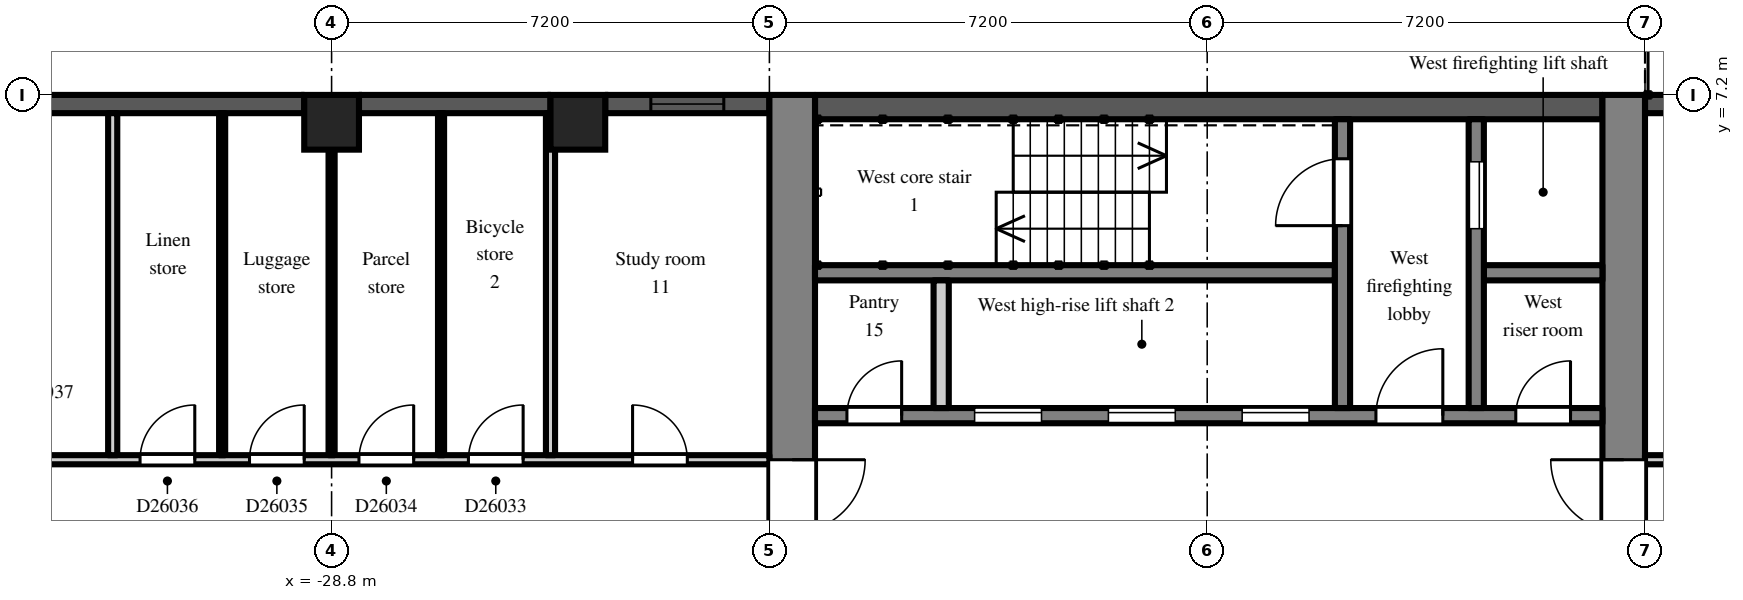
"""IFC4 building model, lengths in metres.
Left out: names, types, materials, properties, quantities, classifications, styles, units other than length and angle.
Written with IfcOpenShell. Run it as: python <this file> out.ifc"""

import sys

from ifc_helpers import new_model, si_unit, direction, frame, frame_2d, origin, origin_2d, place, context, subcontext, project, spatial, rectangle, extrude, element, fill, save


model = new_model("IFC4")
c1 = context("Model", 3, precision=1e-05, world=origin(), true_north=direction((0.0, 1.0)))
c2 = subcontext(c1, "Body", "Model", "MODEL_VIEW")
j1 = project(units=[si_unit("LENGTHUNIT", "METRE"), si_unit("PLANEANGLEUNIT", "RADIAN")], contexts=[c1])
p1 = place(None, origin())
s1 = spatial("IfcSite", under=j1, at=p1, CompositionType="ELEMENT")
p2 = place(p1, origin())
s2 = spatial("IfcBuilding", under=s1, at=p2, CompositionType="ELEMENT")
p3 = place(p2, frame((0.0, 0.0, 179.7)))
s3 = spatial("IfcBuildingStorey", under=s2, at=p3, CompositionType="ELEMENT", Elevation=179.7)
for number, where, z_axis, x_axis in (
    (1, (-28.8, 6.75, 0.0), (0.0, 0.0, 1.0), (1.0, 0.0, 0.0)),
    (2, (-24.75, 6.75, 0.0), (0.0, 0.0, 1.0), (1.0, 0.0, 0.0)),
):
    element("IfcColumn", number, at=place(p3, frame(where, z_axis=z_axis, x_axis=x_axis)), inside=s3, PredefinedType="COLUMN", context=c2, shape_type="SweptSolid", body=[
        extrude(rectangle(XDim=0.9, YDim=0.9, at=origin_2d()), origin(), (0.0, 0.0, 1.0), 3.0),
    ])
p4 = place(p3, frame((-4.2, 7.05, 0.0), z_axis=(0.0, 0.0, 1.0), x_axis=(-1.0, 0.0, 0.0)))
e3 = element("IfcWall", 3, at=p4, inside=s3, PredefinedType="SOLIDWALL", context=c2, shape_type="SweptSolid", body=[
    extrude(rectangle(XDim=3.0, YDim=0.3, at=frame_2d((1.5, 0.0))), origin(), (0.0, 0.0, 1.0), 2.2),
])
p5 = place(p3, frame((-21.6, 7.05, 0.0), z_axis=(0.0, 0.0, 1.0), x_axis=(-1.0, 0.0, 0.0)))
e4 = element("IfcWall", 4, at=p5, inside=s3, PredefinedType="SOLIDWALL", context=c2, shape_type="SweptSolid", body=[
    extrude(rectangle(XDim=2.7, YDim=0.3, at=frame_2d((1.35, 0.0))), origin(), (0.0, 0.0, 1.0), 2.2),
])
p6 = place(p5, frame((0.75, 0.0, 0.2)))
e5 = element("IfcOpeningElement", 5, at=p6, cuts=e4, PredefinedType="OPENING", context=c2, shape_type="SweptSolid", body=[
    extrude(rectangle(XDim=1.2, YDim=1.85, at=frame_2d((0.6, 0.925))), frame((0.0, 0.16, 0.0), z_axis=(0.0, -1.0, 0.0), x_axis=(1.0, 0.0, 0.0)), (0.0, 0.0, 1.0), 0.32),
])
p7 = place(p3, frame((-25.2, 7.05, 0.0), z_axis=(0.0, 0.0, 1.0), x_axis=(-1.0, 0.0, 0.0)))
e6 = element("IfcWall", 6, at=p7, inside=s3, PredefinedType="SOLIDWALL", context=c2, shape_type="SweptSolid", body=[
    extrude(rectangle(XDim=3.15, YDim=0.3, at=frame_2d((1.575, 0.0))), origin(), (0.0, 0.0, 1.0), 2.2),
])
p8 = place(p3, frame((-29.25, 7.05, 0.0), z_axis=(0.0, 0.0, 1.0), x_axis=(-1.0, 0.0, 0.0)))
e7 = element("IfcWall", 7, at=p8, inside=s3, PredefinedType="SOLIDWALL", context=c2, shape_type="SweptSolid", body=[
    extrude(rectangle(XDim=6.3, YDim=0.3, at=frame_2d((3.15, 0.0))), origin(), (0.0, 0.0, 1.0), 2.2),
])
p9 = place(p3, frame((-7.55, -7.2, 0.0), z_axis=(0.0, 0.0, 1.0), x_axis=(0.0, 1.0, 0.0)))
e8 = element("IfcWall", 8, at=p9, inside=s3, PredefinedType="SHEAR", context=c2, shape_type="SweptSolid", body=[
    extrude(rectangle(XDim=14.4, YDim=0.7, at=frame_2d((7.2, 0.0))), origin(), (0.0, 0.0, 1.0), 2.6),
])
p10 = place(p9, frame((6.0, 0.0, 0.0)))
e9 = element("IfcOpeningElement", 9, at=p10, cuts=e8, PredefinedType="OPENING", context=c2, shape_type="SweptSolid", body=[
    extrude(rectangle(XDim=2.4, YDim=2.2, at=frame_2d((1.2, 1.1))), frame((0.0, 0.36, 0.0), z_axis=(0.0, -1.0, 0.0), x_axis=(1.0, 0.0, 0.0)), (0.0, 0.0, 1.0), 0.72),
])
p11 = place(p3, frame((-21.225, -7.2, 0.0), z_axis=(0.0, 0.0, 1.0), x_axis=(0.0, 1.0, 0.0)))
e10 = element("IfcWall", 10, at=p11, inside=s3, PredefinedType="SHEAR", context=c2, shape_type="SweptSolid", body=[
    extrude(rectangle(XDim=14.4, YDim=0.75, at=frame_2d((7.2, 0.0))), origin(), (0.0, 0.0, 1.0), 2.6),
])
p12 = place(p11, frame((6.0, 0.0, 0.0)))
e11 = element("IfcOpeningElement", 11, at=p12, cuts=e10, PredefinedType="OPENING", context=c2, shape_type="SweptSolid", body=[
    extrude(rectangle(XDim=2.4, YDim=2.2, at=frame_2d((1.2, 1.1))), frame((0.0, 0.385, 0.0), z_axis=(0.0, -1.0, 0.0), x_axis=(1.0, 0.0, 0.0)), (0.0, 0.0, 1.0), 0.77),
])
p13 = place(p3, frame((-7.9, 7.0, 0.0), z_axis=(0.0, 0.0, 1.0), x_axis=(-1.0, 0.0, 0.0)))
e12 = element("IfcWall", 12, at=p13, inside=s3, PredefinedType="SHEAR", context=c2, shape_type="SweptSolid", body=[
    extrude(rectangle(XDim=12.95, YDim=0.4, at=frame_2d((6.475, 0.0))), origin(), (0.0, 0.0, 1.0), 2.6),
])
p14 = place(p3, frame((-7.9, 1.925, 0.0), z_axis=(0.0, 0.0, 1.0), x_axis=(-1.0, 0.0, 0.0)))
e13 = element("IfcWall", 13, at=p14, inside=s3, PredefinedType="SHEAR", context=c2, shape_type="SweptSolid", body=[
    extrude(rectangle(XDim=12.95, YDim=0.25, at=frame_2d((6.475, 0.0))), origin(), (0.0, 0.0, 1.0), 2.6),
])
p15 = place(p14, frame((4.825, 0.0, 0.0)))
e14 = element("IfcOpeningElement", 14, at=p15, cuts=e13, PredefinedType="OPENING", context=c2, shape_type="SweptSolid", body=[
    extrude(rectangle(XDim=1.1, YDim=2.1, at=frame_2d((0.55, 1.05))), frame((0.0, 0.135, 0.0), z_axis=(0.0, -1.0, 0.0), x_axis=(1.0, 0.0, 0.0)), (0.0, 0.0, 1.0), 0.27),
])
p16 = place(p14, frame((7.025, 0.0, 0.0)))
e15 = element("IfcOpeningElement", 15, at=p16, cuts=e13, PredefinedType="OPENING", context=c2, shape_type="SweptSolid", body=[
    extrude(rectangle(XDim=1.1, YDim=2.1, at=frame_2d((0.55, 1.05))), frame((0.0, 0.135, 0.0), z_axis=(0.0, -1.0, 0.0), x_axis=(1.0, 0.0, 0.0)), (0.0, 0.0, 1.0), 0.27),
])
p17 = place(p14, frame((9.225, 0.0, 0.0)))
e16 = element("IfcOpeningElement", 16, at=p17, cuts=e13, PredefinedType="OPENING", context=c2, shape_type="SweptSolid", body=[
    extrude(rectangle(XDim=1.1, YDim=2.1, at=frame_2d((0.55, 1.05))), frame((0.0, 0.135, 0.0), z_axis=(0.0, -1.0, 0.0), x_axis=(1.0, 0.0, 0.0)), (0.0, 0.0, 1.0), 0.27),
])
p18 = place(p14, frame((0.525, 0.0, 0.0)))
e17 = element("IfcOpeningElement", 17, at=p18, cuts=e13, PredefinedType="OPENING", context=c2, shape_type="SweptSolid", body=[
    extrude(rectangle(XDim=0.9, YDim=2.1, at=frame_2d((0.45, 1.05))), frame((0.0, 0.135, 0.0), z_axis=(0.0, -1.0, 0.0), x_axis=(1.0, 0.0, 0.0)), (0.0, 0.0, 1.0), 0.27),
])
p19 = place(p14, frame((2.625, 0.0, 0.0)))
e18 = element("IfcOpeningElement", 18, at=p19, cuts=e13, PredefinedType="OPENING", context=c2, shape_type="SweptSolid", body=[
    extrude(rectangle(XDim=1.1, YDim=2.1, at=frame_2d((0.55, 1.05))), frame((0.0, 0.135, 0.0), z_axis=(0.0, -1.0, 0.0), x_axis=(1.0, 0.0, 0.0)), (0.0, 0.0, 1.0), 0.27),
])
p20 = place(p14, frame((11.525, 0.0, 0.0)))
e19 = element("IfcOpeningElement", 19, at=p20, cuts=e13, PredefinedType="OPENING", context=c2, shape_type="SweptSolid", body=[
    extrude(rectangle(XDim=0.9, YDim=2.1, at=frame_2d((0.45, 1.05))), frame((0.0, 0.135, 0.0), z_axis=(0.0, -1.0, 0.0), x_axis=(1.0, 0.0, 0.0)), (0.0, 0.0, 1.0), 0.27),
])
p21 = place(p3, frame((-7.9, 4.275, 0.0), z_axis=(0.0, 0.0, 1.0), x_axis=(-1.0, 0.0, 0.0)))
e20 = element("IfcWall", 20, at=p21, inside=s3, PredefinedType="SHEAR", context=c2, shape_type="SweptSolid", body=[
    extrude(rectangle(XDim=1.95, YDim=0.25, at=frame_2d((0.975, 0.0))), origin(), (0.0, 0.0, 1.0), 2.6),
])
p22 = place(p3, frame((-12.3, 4.275, 0.0), z_axis=(0.0, 0.0, 1.0), x_axis=(-1.0, 0.0, 0.0)))
e21 = element("IfcWall", 21, at=p22, inside=s3, PredefinedType="SHEAR", context=c2, shape_type="SweptSolid", body=[
    extrude(rectangle(XDim=8.55, YDim=0.25, at=frame_2d((4.275, 0.0))), origin(), (0.0, 0.0, 1.0), 2.6),
])
p23 = place(p3, frame((-9.975, 2.05, 0.0), z_axis=(0.0, 0.0, 1.0), x_axis=(0.0, 1.0, 0.0)))
e22 = element("IfcWall", 22, at=p23, inside=s3, PredefinedType="SHEAR", context=c2, shape_type="SweptSolid", body=[
    extrude(rectangle(XDim=4.75, YDim=0.25, at=frame_2d((2.375, 0.0))), origin(), (0.0, 0.0, 1.0), 2.6),
])
p24 = place(p23, frame((2.95, 0.0, 0.0)))
e23 = element("IfcOpeningElement", 23, at=p24, cuts=e22, PredefinedType="OPENING", context=c2, shape_type="SweptSolid", body=[
    extrude(rectangle(XDim=1.1, YDim=2.1, at=frame_2d((0.55, 1.05))), frame((0.0, 0.135, 0.0), z_axis=(0.0, -1.0, 0.0), x_axis=(1.0, 0.0, 0.0)), (0.0, 0.0, 1.0), 0.27),
])
p25 = place(p3, frame((-12.175, 2.05, 0.0), z_axis=(0.0, 0.0, 1.0), x_axis=(0.0, 1.0, 0.0)))
e24 = element("IfcWall", 24, at=p25, inside=s3, PredefinedType="SHEAR", context=c2, shape_type="SweptSolid", body=[
    extrude(rectangle(XDim=4.75, YDim=0.25, at=frame_2d((2.375, 0.0))), origin(), (0.0, 0.0, 1.0), 2.6),
])
p26 = place(p25, frame((3.0, 0.0, 0.0)))
e25 = element("IfcOpeningElement", 25, at=p26, cuts=e24, PredefinedType="OPENING", context=c2, shape_type="SweptSolid", body=[
    extrude(rectangle(XDim=1.1, YDim=2.1, at=frame_2d((0.55, 1.05))), frame((0.0, 0.135, 0.0), z_axis=(0.0, -1.0, 0.0), x_axis=(1.0, 0.0, 0.0)), (0.0, 0.0, 1.0), 0.27),
])
p27 = place(p3, frame((-18.775, 2.05, 0.0), z_axis=(0.0, 0.0, 1.0), x_axis=(0.0, 1.0, 0.0)))
e26 = element("IfcWall", 26, at=p27, inside=s3, PredefinedType="PARTITIONING", context=c2, shape_type="SweptSolid", body=[
    extrude(rectangle(XDim=2.1, YDim=0.25, at=frame_2d((1.05, 0.0))), origin(), (0.0, 0.0, 1.0), 2.6),
])
p28 = place(p3, frame((-36.5, 1.2, 0.0), z_axis=(0.0, 0.0, 1.0), x_axis=(1.0, 0.0, 0.0)))
e27 = element("IfcWall", 27, at=p28, inside=s3, PredefinedType="PARTITIONING", context=c2, shape_type="SweptSolid", body=[
    extrude(rectangle(XDim=14.9, YDim=0.15, at=frame_2d((7.45, 0.0))), origin(), (0.0, 0.0, 1.0), 2.6),
])
p29 = place(p28, frame((12.65, 0.0, 0.0)))
e28 = element("IfcOpeningElement", 28, at=p29, cuts=e27, PredefinedType="OPENING", context=c2, shape_type="SweptSolid", body=[
    extrude(rectangle(XDim=0.9, YDim=2.1, at=frame_2d((0.45, 1.05))), frame((0.0, 0.085, 0.0), z_axis=(0.0, -1.0, 0.0), x_axis=(1.0, 0.0, 0.0)), (0.0, 0.0, 1.0), 0.17),
])
p30 = place(p28, frame((9.95, 0.0, 0.0)))
e29 = element("IfcOpeningElement", 29, at=p30, cuts=e27, PredefinedType="OPENING", context=c2, shape_type="SweptSolid", body=[
    extrude(rectangle(XDim=0.9, YDim=2.1, at=frame_2d((0.45, 1.05))), frame((0.0, 0.085, 0.0), z_axis=(0.0, -1.0, 0.0), x_axis=(1.0, 0.0, 0.0)), (0.0, 0.0, 1.0), 0.17),
])
p31 = place(p28, frame((8.15, 0.0, 0.0)))
e30 = element("IfcOpeningElement", 30, at=p31, cuts=e27, PredefinedType="OPENING", context=c2, shape_type="SweptSolid", body=[
    extrude(rectangle(XDim=0.9, YDim=2.1, at=frame_2d((0.45, 1.05))), frame((0.0, 0.085, 0.0), z_axis=(0.0, -1.0, 0.0), x_axis=(1.0, 0.0, 0.0)), (0.0, 0.0, 1.0), 0.17),
])
p32 = place(p28, frame((6.35, 0.0, 0.0)))
e31 = element("IfcOpeningElement", 31, at=p32, cuts=e27, PredefinedType="OPENING", context=c2, shape_type="SweptSolid", body=[
    extrude(rectangle(XDim=0.9, YDim=2.1, at=frame_2d((0.45, 1.05))), frame((0.0, 0.085, 0.0), z_axis=(0.0, -1.0, 0.0), x_axis=(1.0, 0.0, 0.0)), (0.0, 0.0, 1.0), 0.17),
])
p33 = place(p28, frame((4.55, 0.0, 0.0)))
e32 = element("IfcOpeningElement", 32, at=p33, cuts=e27, PredefinedType="OPENING", context=c2, shape_type="SweptSolid", body=[
    extrude(rectangle(XDim=0.9, YDim=2.1, at=frame_2d((0.45, 1.05))), frame((0.0, 0.085, 0.0), z_axis=(0.0, -1.0, 0.0), x_axis=(1.0, 0.0, 0.0)), (0.0, 0.0, 1.0), 0.17),
])
p34 = place(p28, frame((1.15, 0.0, 0.0)))
e33 = element("IfcOpeningElement", 33, at=p34, cuts=e27, PredefinedType="OPENING", context=c2, shape_type="SweptSolid", body=[
    extrude(rectangle(XDim=1.8, YDim=2.1, at=frame_2d((0.9, 1.05))), frame((0.0, 0.085, 0.0), z_axis=(0.0, -1.0, 0.0), x_axis=(1.0, 0.0, 0.0)), (0.0, 0.0, 1.0), 0.17),
])
p35 = place(p3, frame((-32.4, 1.275, 0.0), z_axis=(0.0, 0.0, 1.0), x_axis=(0.0, 1.0, 0.0)))
e34 = element("IfcWall", 34, at=p35, inside=s3, PredefinedType="PARTITIONING", context=c2, shape_type="SweptSolid", body=[
    extrude(rectangle(XDim=5.625, YDim=0.15, at=frame_2d((2.812, 0.0))), origin(), (0.0, 0.0, 1.0), 2.6),
])
for number, where, z_axis, x_axis in (
    (35, (-30.6, 1.275, 0.0), (0.0, 0.0, 1.0), (0.0, 1.0, 0.0)),
    (36, (-28.8, 1.275, 0.0), (0.0, 0.0, 1.0), (0.0, 1.0, 0.0)),
    (37, (-27.0, 1.275, 0.0), (0.0, 0.0, 1.0), (0.0, 1.0, 0.0)),
):
    element("IfcWall", number, at=place(p3, frame(where, z_axis=z_axis, x_axis=x_axis)), inside=s3, PredefinedType="PARTITIONING", context=c2, shape_type="SweptSolid", body=[
        extrude(rectangle(XDim=5.625, YDim=0.1, at=frame_2d((2.812, 0.0))), origin(), (0.0, 0.0, 1.0), 2.6),
    ])
p36 = place(p3, frame((-25.2, 1.275, 0.0), z_axis=(0.0, 0.0, 1.0), x_axis=(0.0, 1.0, 0.0)))
e38 = element("IfcWall", 38, at=p36, inside=s3, PredefinedType="PARTITIONING", context=c2, shape_type="SweptSolid", body=[
    extrude(rectangle(XDim=5.625, YDim=0.15, at=frame_2d((2.812, 0.0))), origin(), (0.0, 0.0, 1.0), 2.6),
])
p37 = place(p3, frame((-7.2, 1.2, 0.0), z_axis=(0.0, 0.0, 1.0), x_axis=(1.0, 0.0, 0.0)))
e39 = element("IfcWall", 39, at=p37, inside=s3, PredefinedType="PARTITIONING", context=c2, shape_type="SweptSolid", body=[
    extrude(rectangle(XDim=6.075, YDim=0.15, at=frame_2d((3.038, 0.0))), origin(), (0.0, 0.0, 1.0), 2.6),
])
p38 = place(p37, frame((1.05, 0.0, 0.0)))
e40 = element("IfcOpeningElement", 40, at=p38, cuts=e39, PredefinedType="OPENING", context=c2, shape_type="SweptSolid", body=[
    extrude(rectangle(XDim=0.9, YDim=2.1, at=frame_2d((0.45, 1.05))), frame((0.0, 0.085, 0.0), z_axis=(0.0, -1.0, 0.0), x_axis=(1.0, 0.0, 0.0)), (0.0, 0.0, 1.0), 0.17),
])
p39 = place(p6, origin())
e41 = element("IfcWindow", 41, at=p39, inside=s3, PartitioningType="SINGLE_PANEL", PredefinedType="WINDOW", context=c2, shape_type="SweptSolid", body=[
    extrude(rectangle(XDim=1.2, YDim=1.85, at=frame_2d((0.6, 0.925))), frame((0.0, 0.03, 0.0), z_axis=(0.0, -1.0, 0.0), x_axis=(1.0, 0.0, 0.0)), (0.0, 0.0, 1.0), 0.06),
])
fill(e5, e41)
p40 = place(p15, origin())
e42 = element("IfcDoor", 42, at=p40, inside=s3, OperationType="SLIDING_TO_LEFT", PredefinedType="DOOR", context=c2, shape_type="SweptSolid", body=[
    extrude(rectangle(XDim=1.1, YDim=2.1, at=frame_2d((0.55, 1.05))), frame((0.0, 0.025, 0.0), z_axis=(0.0, -1.0, 0.0), x_axis=(1.0, 0.0, 0.0)), (0.0, 0.0, 1.0), 0.05),
])
fill(e14, e42)
p41 = place(p16, origin())
e43 = element("IfcDoor", 43, at=p41, inside=s3, OperationType="SLIDING_TO_LEFT", PredefinedType="DOOR", context=c2, shape_type="SweptSolid", body=[
    extrude(rectangle(XDim=1.1, YDim=2.1, at=frame_2d((0.55, 1.05))), frame((0.0, 0.025, 0.0), z_axis=(0.0, -1.0, 0.0), x_axis=(1.0, 0.0, 0.0)), (0.0, 0.0, 1.0), 0.05),
])
fill(e15, e43)
p42 = place(p17, origin())
e44 = element("IfcDoor", 44, at=p42, inside=s3, OperationType="SLIDING_TO_LEFT", PredefinedType="DOOR", context=c2, shape_type="SweptSolid", body=[
    extrude(rectangle(XDim=1.1, YDim=2.1, at=frame_2d((0.55, 1.05))), frame((0.0, 0.025, 0.0), z_axis=(0.0, -1.0, 0.0), x_axis=(1.0, 0.0, 0.0)), (0.0, 0.0, 1.0), 0.05),
])
fill(e16, e44)
p43 = place(p24, origin())
e45 = element("IfcDoor", 45, at=p43, inside=s3, OperationType="SLIDING_TO_LEFT", PredefinedType="DOOR", context=c2, shape_type="SweptSolid", body=[
    extrude(rectangle(XDim=1.1, YDim=2.1, at=frame_2d((0.55, 1.05))), frame((0.0, 0.025, 0.0), z_axis=(0.0, -1.0, 0.0), x_axis=(1.0, 0.0, 0.0)), (0.0, 0.0, 1.0), 0.05),
])
fill(e23, e45)
p44 = place(p26, origin())
e46 = element("IfcDoor", 46, at=p44, inside=s3, OperationType="SINGLE_SWING_LEFT", PredefinedType="DOOR", context=c2, shape_type="SweptSolid", body=[
    extrude(rectangle(XDim=1.1, YDim=2.1, at=frame_2d((0.55, 1.05))), frame((0.0, 0.025, 0.0), z_axis=(0.0, -1.0, 0.0), x_axis=(1.0, 0.0, 0.0)), (0.0, 0.0, 1.0), 0.05),
])
fill(e25, e46)
p45 = place(p18, frame((0.9, 0.0, 0.0), z_axis=(0.0, 0.0, 1.0), x_axis=(-1.0, 0.0, 0.0)))
e47 = element("IfcDoor", 47, at=p45, inside=s3, OperationType="SINGLE_SWING_RIGHT", PredefinedType="DOOR", context=c2, shape_type="SweptSolid", body=[
    extrude(rectangle(XDim=0.9, YDim=2.1, at=frame_2d((0.45, 1.05))), frame((0.0, 0.025, 0.0), z_axis=(0.0, -1.0, 0.0), x_axis=(1.0, 0.0, 0.0)), (0.0, 0.0, 1.0), 0.05),
])
fill(e17, e47)
p46 = place(p19, frame((1.1, 0.0, 0.0), z_axis=(0.0, 0.0, 1.0), x_axis=(-1.0, 0.0, 0.0)))
e48 = element("IfcDoor", 48, at=p46, inside=s3, OperationType="SINGLE_SWING_RIGHT", PredefinedType="DOOR", context=c2, shape_type="SweptSolid", body=[
    extrude(rectangle(XDim=1.1, YDim=2.1, at=frame_2d((0.55, 1.05))), frame((0.0, 0.025, 0.0), z_axis=(0.0, -1.0, 0.0), x_axis=(1.0, 0.0, 0.0)), (0.0, 0.0, 1.0), 0.05),
])
fill(e18, e48)
p47 = place(p10, origin())
e49 = element("IfcDoor", 49, at=p47, inside=s3, OperationType="DOUBLE_DOOR_DOUBLE_SWING", PredefinedType="DOOR", context=c2, shape_type="SweptSolid", body=[
    extrude(rectangle(XDim=2.4, YDim=2.2, at=frame_2d((1.2, 1.1))), frame((0.0, 0.025, 0.0), z_axis=(0.0, -1.0, 0.0), x_axis=(1.0, 0.0, 0.0)), (0.0, 0.0, 1.0), 0.05),
])
fill(e9, e49)
p48 = place(p12, frame((2.4, 0.0, 0.0), z_axis=(0.0, 0.0, 1.0), x_axis=(-1.0, 0.0, 0.0)))
e50 = element("IfcDoor", 50, at=p48, inside=s3, OperationType="DOUBLE_DOOR_DOUBLE_SWING", PredefinedType="DOOR", context=c2, shape_type="SweptSolid", body=[
    extrude(rectangle(XDim=2.4, YDim=2.2, at=frame_2d((1.2, 1.1))), frame((0.0, 0.025, 0.0), z_axis=(0.0, -1.0, 0.0), x_axis=(1.0, 0.0, 0.0)), (0.0, 0.0, 1.0), 0.05),
])
fill(e11, e50)
p49 = place(p20, frame((0.9, 0.0, 0.0), z_axis=(0.0, 0.0, 1.0), x_axis=(-1.0, 0.0, 0.0)))
e51 = element("IfcDoor", 51, at=p49, inside=s3, OperationType="SINGLE_SWING_RIGHT", PredefinedType="DOOR", context=c2, shape_type="SweptSolid", body=[
    extrude(rectangle(XDim=0.9, YDim=2.1, at=frame_2d((0.45, 1.05))), frame((0.0, 0.025, 0.0), z_axis=(0.0, -1.0, 0.0), x_axis=(1.0, 0.0, 0.0)), (0.0, 0.0, 1.0), 0.05),
])
fill(e19, e51)
p50 = place(p29, origin())
e52 = element("IfcDoor", 52, at=p50, inside=s3, OperationType="SINGLE_SWING_LEFT", PredefinedType="DOOR", context=c2, shape_type="SweptSolid", body=[
    extrude(rectangle(XDim=0.9, YDim=2.1, at=frame_2d((0.45, 1.05))), frame((0.0, 0.025, 0.0), z_axis=(0.0, -1.0, 0.0), x_axis=(1.0, 0.0, 0.0)), (0.0, 0.0, 1.0), 0.05),
])
fill(e28, e52)
p51 = place(p30, origin())
e53 = element("IfcDoor", 53, at=p51, inside=s3, OperationType="SINGLE_SWING_RIGHT", PredefinedType="DOOR", context=c2, shape_type="SweptSolid", body=[
    extrude(rectangle(XDim=0.9, YDim=2.1, at=frame_2d((0.45, 1.05))), frame((0.0, 0.025, 0.0), z_axis=(0.0, -1.0, 0.0), x_axis=(1.0, 0.0, 0.0)), (0.0, 0.0, 1.0), 0.05),
])
fill(e29, e53)
p52 = place(p31, origin())
e54 = element("IfcDoor", 54, at=p52, inside=s3, OperationType="SINGLE_SWING_RIGHT", PredefinedType="DOOR", context=c2, shape_type="SweptSolid", body=[
    extrude(rectangle(XDim=0.9, YDim=2.1, at=frame_2d((0.45, 1.05))), frame((0.0, 0.025, 0.0), z_axis=(0.0, -1.0, 0.0), x_axis=(1.0, 0.0, 0.0)), (0.0, 0.0, 1.0), 0.05),
])
fill(e30, e54)
p53 = place(p32, origin())
e55 = element("IfcDoor", 55, at=p53, inside=s3, OperationType="SINGLE_SWING_RIGHT", PredefinedType="DOOR", context=c2, shape_type="SweptSolid", body=[
    extrude(rectangle(XDim=0.9, YDim=2.1, at=frame_2d((0.45, 1.05))), frame((0.0, 0.025, 0.0), z_axis=(0.0, -1.0, 0.0), x_axis=(1.0, 0.0, 0.0)), (0.0, 0.0, 1.0), 0.05),
])
fill(e31, e55)
p54 = place(p33, origin())
e56 = element("IfcDoor", 56, at=p54, inside=s3, OperationType="SINGLE_SWING_RIGHT", PredefinedType="DOOR", context=c2, shape_type="SweptSolid", body=[
    extrude(rectangle(XDim=0.9, YDim=2.1, at=frame_2d((0.45, 1.05))), frame((0.0, 0.025, 0.0), z_axis=(0.0, -1.0, 0.0), x_axis=(1.0, 0.0, 0.0)), (0.0, 0.0, 1.0), 0.05),
])
fill(e32, e56)
save(model, sys.argv[1])
